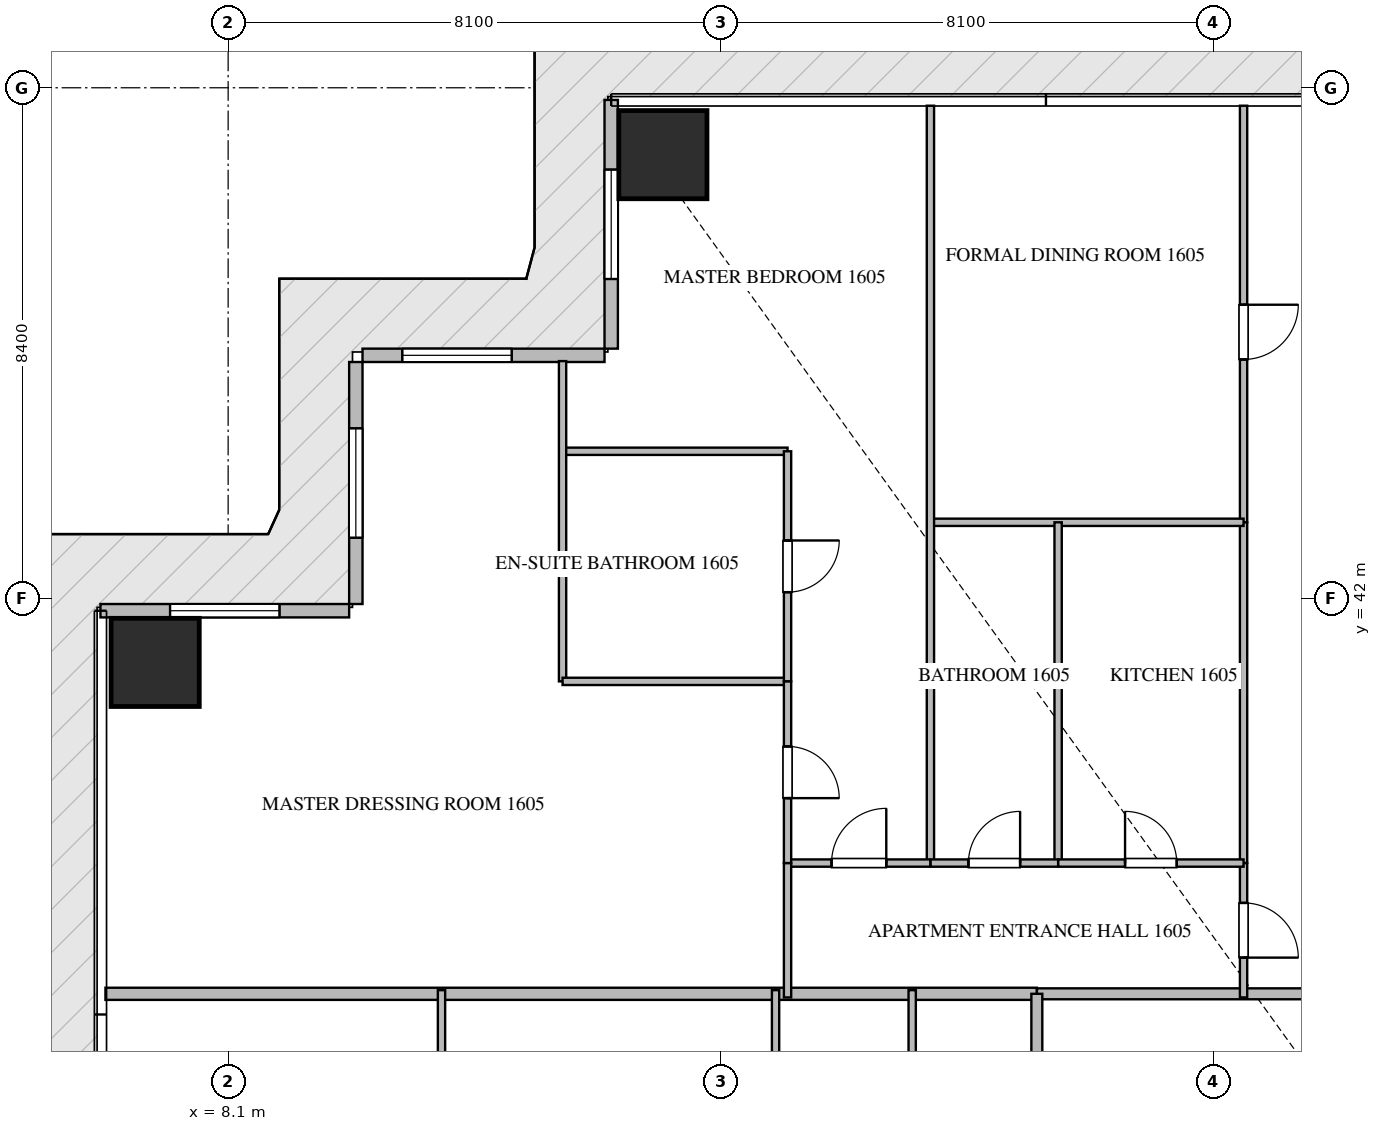
"""IFC4 building model, lengths in metres.
Left out: names, types, materials, properties, quantities, classifications, styles, units other than length and angle.
Written with IfcOpenShell. Run it as: python <this file> out.ifc"""

import sys

from ifc_helpers import new_model, si_unit, direction, frame, frame_2d, origin, origin_2d, place, context, subcontext, project, spatial, rectangle, extrude, source, transform, mapped, element, fill, save


model = new_model("IFC4")
c1 = context("Model", 3, precision=1e-05, world=origin(), true_north=direction((0.0, 1.0)))
c2 = subcontext(c1, "Body", "Model", "MODEL_VIEW")
j1 = project(units=[si_unit("LENGTHUNIT", "METRE"), si_unit("PLANEANGLEUNIT", "RADIAN")], contexts=[c1])
p1 = place(None, origin())
s1 = spatial("IfcSite", under=j1, at=p1, CompositionType="ELEMENT")
p2 = place(p1, origin())
s2 = spatial("IfcBuilding", under=s1, at=p2, CompositionType="ELEMENT")
p3 = place(p2, frame((0.0, 0.0, 67.95)))
s3 = spatial("IfcBuildingStorey", under=s2, at=p3, CompositionType="ELEMENT", Elevation=67.95)
m1 = source(origin(), c2, "Body", "SweptSolid", [
    extrude(rectangle(XDim=1.45, YDim=1.45, at=origin_2d()), origin(), (0.0, 0.0, 1.0), 3.75),
])
for number, where, z_axis, x_axis in (
    (1, (15.25, 49.3, -0.26), (0.0, 0.0, 1.0), (1.0, 0.0, 0.0)),
    (2, (6.9, 40.95, -0.26), (0.0, 0.0, 1.0), (1.0, 0.0, 0.0)),
):
    element("IfcColumn", number, at=place(p3, frame(where, z_axis=z_axis, x_axis=x_axis)), inside=s3, PredefinedType="COLUMN", context=c2, shape_type="MappedRepresentation", body=[
        mapped(m1, transform((0.0, 0.0, 0.0), scale=1.0)),
    ])
p4 = place(p3, frame((14.4, 50.2, 0.0), z_axis=(0.0, 0.0, 1.0), x_axis=(0.0, -1.0, 0.0)))
e3 = element("IfcWall", 3, at=p4, inside=s3, PredefinedType="ELEMENTEDWALL", context=c2, shape_type="SweptSolid", body=[
    extrude(rectangle(XDim=4.09, YDim=0.22, at=frame_2d((2.045, 0.0))), origin(), (0.0, 0.0, 1.0), 3.475),
])
p5 = place(p4, frame((1.145, 0.0, 0.65)))
e4 = element("IfcOpeningElement", 4, at=p5, cuts=e3, PredefinedType="OPENING", context=c2, shape_type="SweptSolid", body=[
    extrude(rectangle(XDim=1.8, YDim=2.1, at=frame_2d((0.9, 1.05))), frame((0.0, 0.12, 0.0), z_axis=(0.0, -1.0, 0.0), x_axis=(1.0, 0.0, 0.0)), (0.0, 0.0, 1.0), 0.24),
])
p6 = place(p3, frame((14.29, 46.0, 0.0), z_axis=(0.0, 0.0, 1.0), x_axis=(-1.0, 0.0, 0.0)))
e5 = element("IfcWall", 5, at=p6, inside=s3, PredefinedType="ELEMENTEDWALL", context=c2, shape_type="SweptSolid", body=[
    extrude(rectangle(XDim=3.98, YDim=0.22, at=frame_2d((1.99, 0.0))), origin(), (0.0, 0.0, 1.0), 3.475),
])
p7 = place(p6, frame((1.526, 0.0, 0.65)))
e6 = element("IfcOpeningElement", 6, at=p7, cuts=e5, PredefinedType="OPENING", context=c2, shape_type="SweptSolid", body=[
    extrude(rectangle(XDim=1.8, YDim=2.1, at=frame_2d((0.9, 1.05))), frame((0.0, 0.12, 0.0), z_axis=(0.0, -1.0, 0.0), x_axis=(1.0, 0.0, 0.0)), (0.0, 0.0, 1.0), 0.24),
])
p8 = place(p3, frame((10.2, 45.89, 0.0), z_axis=(0.0, 0.0, 1.0), x_axis=(0.0, -1.0, 0.0)))
e7 = element("IfcWall", 7, at=p8, inside=s3, PredefinedType="ELEMENTEDWALL", context=c2, shape_type="SweptSolid", body=[
    extrude(rectangle(XDim=3.98, YDim=0.22, at=frame_2d((1.99, 0.0))), origin(), (0.0, 0.0, 1.0), 3.475),
])
p9 = place(p8, frame((1.09, 0.0, 0.65)))
e8 = element("IfcOpeningElement", 8, at=p9, cuts=e7, PredefinedType="OPENING", context=c2, shape_type="SweptSolid", body=[
    extrude(rectangle(XDim=1.8, YDim=2.1, at=frame_2d((0.9, 1.05))), frame((0.0, 0.12, 0.0), z_axis=(0.0, -1.0, 0.0), x_axis=(1.0, 0.0, 0.0)), (0.0, 0.0, 1.0), 0.24),
])
p10 = place(p3, frame((10.09, 41.8, 0.0), z_axis=(0.0, 0.0, 1.0), x_axis=(-1.0, 0.0, 0.0)))
e9 = element("IfcWall", 9, at=p10, inside=s3, PredefinedType="ELEMENTEDWALL", context=c2, shape_type="SweptSolid", body=[
    extrude(rectangle(XDim=4.09, YDim=0.22, at=frame_2d((2.045, 0.0))), origin(), (0.0, 0.0, 1.0), 3.475),
])
p11 = place(p10, frame((1.145, 0.0, 0.65)))
e10 = element("IfcOpeningElement", 10, at=p11, cuts=e9, PredefinedType="OPENING", context=c2, shape_type="SweptSolid", body=[
    extrude(rectangle(XDim=1.8, YDim=2.1, at=frame_2d((0.9, 1.05))), frame((0.0, 0.12, 0.0), z_axis=(0.0, -1.0, 0.0), x_axis=(1.0, 0.0, 0.0)), (0.0, 0.0, 1.0), 0.24),
])
p12 = place(p3, frame((6.082, 35.5, 0.0), z_axis=(0.0, 0.0, 1.0), x_axis=(1.0, 0.0, 0.0)))
e11 = element("IfcWall", 11, at=p12, inside=s3, PredefinedType="PARTITIONING", context=c2, shape_type="SweptSolid", body=[
    extrude(rectangle(XDim=15.318, YDim=0.2, at=frame_2d((7.659, 0.0))), origin(), (0.0, 0.0, 1.0), 3.49),
])
p13 = place(p3, frame((21.402, 35.5, 0.0), z_axis=(0.0, 0.0, 1.0), x_axis=(1.0, 0.0, 0.0)))
e12 = element("IfcWall", 12, at=p13, inside=s3, PredefinedType="PARTITIONING", context=c2, shape_type="SweptSolid", body=[
    extrude(rectangle(XDim=21.996, YDim=0.18, at=frame_2d((10.998, 0.0))), origin(), (0.0, 0.0, 1.0), 3.49),
])
p14 = place(p13, frame((7.202, 0.0, 0.0)))
e13 = element("IfcOpeningElement", 13, at=p14, cuts=e12, PredefinedType="OPENING", context=c2, shape_type="SweptSolid", body=[
    extrude(rectangle(XDim=1.0, YDim=2.15, at=frame_2d((0.5, 1.075))), frame((0.0, 0.1, 0.0), z_axis=(0.0, -1.0, 0.0), x_axis=(1.0, 0.0, 0.0)), (0.0, 0.0, 1.0), 0.2),
])
p15 = place(p3, frame((21.4, 14.9, 0.0), z_axis=(0.0, 0.0, 1.0), x_axis=(0.0, 1.0, 0.0)))
e14 = element("IfcWall", 14, at=p15, inside=s3, PredefinedType="PARTITIONING", context=c2, shape_type="SweptSolid", body=[
    extrude(rectangle(XDim=20.6, YDim=0.18, at=frame_2d((10.3, 0.0))), origin(), (0.0, 0.0, 1.0), 3.49),
])
p16 = place(p15, frame((5.527, 0.0, 0.0)))
e15 = element("IfcOpeningElement", 15, at=p16, cuts=e14, PredefinedType="OPENING", context=c2, shape_type="SweptSolid", body=[
    extrude(rectangle(XDim=1.0, YDim=2.15, at=frame_2d((0.5, 1.075))), frame((0.0, 0.1, 0.0), z_axis=(0.0, -1.0, 0.0), x_axis=(1.0, 0.0, 0.0)), (0.0, 0.0, 1.0), 0.2),
])
p17 = place(p15, frame((10.604, 0.0, 0.0)))
e16 = element("IfcOpeningElement", 16, at=p17, cuts=e14, PredefinedType="OPENING", context=c2, shape_type="SweptSolid", body=[
    extrude(rectangle(XDim=1.0, YDim=2.15, at=frame_2d((0.5, 1.075))), frame((0.0, 0.1, 0.0), z_axis=(0.0, -1.0, 0.0), x_axis=(1.0, 0.0, 0.0)), (0.0, 0.0, 1.0), 0.2),
])
p18 = place(p3, frame((24.8, 37.65, 0.0), z_axis=(0.0, 0.0, 1.0), x_axis=(0.0, -1.0, 0.0)))
e17 = element("IfcWall", 17, at=p18, inside=s3, PredefinedType="PARTITIONING", context=c2, shape_type="SweptSolid", body=[
    extrude(rectangle(XDim=2.21, YDim=0.12, at=frame_2d((1.105, 0.0))), origin(), (0.0, 0.0, 1.0), 3.49),
])
p19 = place(p18, frame((0.655, 0.0, 0.0)))
e18 = element("IfcOpeningElement", 18, at=p19, cuts=e17, PredefinedType="OPENING", context=c2, shape_type="SweptSolid", body=[
    extrude(rectangle(XDim=0.9, YDim=2.1, at=frame_2d((0.45, 1.05))), frame((0.0, 0.07, 0.0), z_axis=(0.0, -1.0, 0.0), x_axis=(1.0, 0.0, 0.0)), (0.0, 0.0, 1.0), 0.14),
])
p20 = place(p3, frame((24.8, 50.105, 0.0), z_axis=(0.0, 0.0, 1.0), x_axis=(0.0, -1.0, 0.0)))
e19 = element("IfcWall", 19, at=p20, inside=s3, PredefinedType="PARTITIONING", context=c2, shape_type="SweptSolid", body=[
    extrude(rectangle(XDim=6.851, YDim=0.12, at=frame_2d((3.426, 0.0))), origin(), (0.0, 0.0, 1.0), 3.49),
])
p21 = place(p20, frame((3.273, 0.0, 0.0)))
e20 = element("IfcOpeningElement", 20, at=p21, cuts=e19, PredefinedType="OPENING", context=c2, shape_type="SweptSolid", body=[
    extrude(rectangle(XDim=0.9, YDim=2.1, at=frame_2d((0.45, 1.05))), frame((0.0, 0.07, 0.0), z_axis=(0.0, -1.0, 0.0), x_axis=(1.0, 0.0, 0.0)), (0.0, 0.0, 1.0), 0.14),
])
p22 = place(p3, frame((24.8, 43.252, 0.0), z_axis=(0.0, 0.0, 1.0), x_axis=(0.0, -1.0, 0.0)))
e21 = element("IfcWall", 21, at=p22, inside=s3, PredefinedType="PARTITIONING", context=c2, shape_type="SweptSolid", body=[
    extrude(rectangle(XDim=5.6, YDim=0.12, at=frame_2d((2.8, 0.0))), origin(), (0.0, 0.0, 1.0), 3.49),
])
p23 = place(p3, frame((19.65, 43.254, 0.0), z_axis=(0.0, 0.0, 1.0), x_axis=(1.0, 0.0, 0.0)))
e22 = element("IfcWall", 22, at=p23, inside=s3, PredefinedType="PARTITIONING", context=c2, shape_type="SweptSolid", body=[
    extrude(rectangle(XDim=5.15, YDim=0.12, at=frame_2d((2.575, 0.0))), origin(), (0.0, 0.0, 1.0), 3.49),
])
p24 = place(p3, frame((19.65, 50.105, 0.0), z_axis=(0.0, 0.0, 1.0), x_axis=(0.0, -1.0, 0.0)))
e23 = element("IfcWall", 23, at=p24, inside=s3, PredefinedType="PARTITIONING", context=c2, shape_type="SweptSolid", body=[
    extrude(rectangle(XDim=12.455, YDim=0.12, at=frame_2d((6.228, 0.0))), origin(), (0.0, 0.0, 1.0), 3.49),
])
p25 = place(p3, frame((21.75, 43.254, 0.0), z_axis=(0.0, 0.0, 1.0), x_axis=(0.0, -1.0, 0.0)))
e24 = element("IfcWall", 24, at=p25, inside=s3, PredefinedType="PARTITIONING", context=c2, shape_type="SweptSolid", body=[
    extrude(rectangle(XDim=5.604, YDim=0.12, at=frame_2d((2.802, 0.0))), origin(), (0.0, 0.0, 1.0), 3.49),
])
p26 = place(p3, frame((19.65, 37.65, 0.0), z_axis=(0.0, 0.0, 1.0), x_axis=(1.0, 0.0, 0.0)))
e25 = element("IfcWall", 25, at=p26, inside=s3, PredefinedType="PARTITIONING", context=c2, shape_type="SweptSolid", body=[
    extrude(rectangle(XDim=2.1, YDim=0.12, at=frame_2d((1.05, 0.0))), origin(), (0.0, 0.0, 1.0), 3.49),
])
p27 = place(p26, frame((0.625, 0.0, 0.0)))
e26 = element("IfcOpeningElement", 26, at=p27, cuts=e25, PredefinedType="OPENING", context=c2, shape_type="SweptSolid", body=[
    extrude(rectangle(XDim=0.85, YDim=2.1, at=frame_2d((0.425, 1.05))), frame((0.0, 0.07, 0.0), z_axis=(0.0, -1.0, 0.0), x_axis=(1.0, 0.0, 0.0)), (0.0, 0.0, 1.0), 0.14),
])
p28 = place(p3, frame((21.752, 37.65, 0.0), z_axis=(0.0, 0.0, 1.0), x_axis=(1.0, 0.0, 0.0)))
e27 = element("IfcWall", 27, at=p28, inside=s3, PredefinedType="PARTITIONING", context=c2, shape_type="SweptSolid", body=[
    extrude(rectangle(XDim=3.048, YDim=0.12, at=frame_2d((1.524, 0.0))), origin(), (0.0, 0.0, 1.0), 3.49),
])
p29 = place(p28, frame((1.099, 0.0, 0.0)))
e28 = element("IfcOpeningElement", 28, at=p29, cuts=e27, PredefinedType="OPENING", context=c2, shape_type="SweptSolid", body=[
    extrude(rectangle(XDim=0.85, YDim=2.1, at=frame_2d((0.425, 1.05))), frame((0.0, 0.07, 0.0), z_axis=(0.0, -1.0, 0.0), x_axis=(1.0, 0.0, 0.0)), (0.0, 0.0, 1.0), 0.14),
])
p30 = place(p3, frame((17.3, 37.65, 0.0), z_axis=(0.0, 0.0, 1.0), x_axis=(1.0, 0.0, 0.0)))
e29 = element("IfcWall", 29, at=p30, inside=s3, PredefinedType="PARTITIONING", context=c2, shape_type="SweptSolid", body=[
    extrude(rectangle(XDim=2.348, YDim=0.12, at=frame_2d((1.174, 0.0))), origin(), (0.0, 0.0, 1.0), 3.49),
])
p31 = place(p30, frame((0.724, 0.0, 0.0)))
e30 = element("IfcOpeningElement", 30, at=p31, cuts=e29, PredefinedType="OPENING", context=c2, shape_type="SweptSolid", body=[
    extrude(rectangle(XDim=0.9, YDim=2.1, at=frame_2d((0.45, 1.05))), frame((0.0, 0.07, 0.0), z_axis=(0.0, -1.0, 0.0), x_axis=(1.0, 0.0, 0.0)), (0.0, 0.0, 1.0), 0.14),
])
p32 = place(p3, frame((13.6, 44.422, 0.0), z_axis=(0.0, 0.0, 1.0), x_axis=(1.0, 0.0, 0.0)))
e31 = element("IfcWall", 31, at=p32, inside=s3, PredefinedType="PARTITIONING", context=c2, shape_type="SweptSolid", body=[
    extrude(rectangle(XDim=3.7, YDim=0.12, at=frame_2d((1.85, 0.0))), origin(), (0.0, 0.0, 1.0), 3.49),
])
p33 = place(p3, frame((13.6, 45.905, 0.0), z_axis=(0.0, 0.0, 1.0), x_axis=(0.0, -1.0, 0.0)))
e32 = element("IfcWall", 32, at=p33, inside=s3, PredefinedType="PARTITIONING", context=c2, shape_type="SweptSolid", body=[
    extrude(rectangle(XDim=5.267, YDim=0.12, at=frame_2d((2.634, 0.0))), origin(), (0.0, 0.0, 1.0), 3.49),
])
p34 = place(p3, frame((13.6, 40.638, 0.0), z_axis=(0.0, 0.0, 1.0), x_axis=(1.0, 0.0, 0.0)))
e33 = element("IfcWall", 33, at=p34, inside=s3, PredefinedType="PARTITIONING", context=c2, shape_type="SweptSolid", body=[
    extrude(rectangle(XDim=3.7, YDim=0.12, at=frame_2d((1.85, 0.0))), origin(), (0.0, 0.0, 1.0), 3.49),
])
p35 = place(p3, frame((17.3, 44.422, 0.0), z_axis=(0.0, 0.0, 1.0), x_axis=(0.0, -1.0, 0.0)))
e34 = element("IfcWall", 34, at=p35, inside=s3, PredefinedType="PARTITIONING", context=c2, shape_type="SweptSolid", body=[
    extrude(rectangle(XDim=3.784, YDim=0.12, at=frame_2d((1.892, 0.0))), origin(), (0.0, 0.0, 1.0), 3.49),
])
p36 = place(p35, frame((1.467, 0.0, 0.0)))
e35 = element("IfcOpeningElement", 35, at=p36, cuts=e34, PredefinedType="OPENING", context=c2, shape_type="SweptSolid", body=[
    extrude(rectangle(XDim=0.85, YDim=2.1, at=frame_2d((0.425, 1.05))), frame((0.0, 0.07, 0.0), z_axis=(0.0, -1.0, 0.0), x_axis=(1.0, 0.0, 0.0)), (0.0, 0.0, 1.0), 0.14),
])
p37 = place(p3, frame((17.3, 40.636, 0.0), z_axis=(0.0, 0.0, 1.0), x_axis=(0.0, -1.0, 0.0)))
e36 = element("IfcWall", 36, at=p37, inside=s3, PredefinedType="PARTITIONING", context=c2, shape_type="SweptSolid", body=[
    extrude(rectangle(XDim=2.986, YDim=0.12, at=frame_2d((1.493, 0.0))), origin(), (0.0, 0.0, 1.0), 3.49),
])
p38 = place(p37, frame((1.068, 0.0, 0.0)))
e37 = element("IfcOpeningElement", 37, at=p38, cuts=e36, PredefinedType="OPENING", context=c2, shape_type="SweptSolid", body=[
    extrude(rectangle(XDim=0.85, YDim=2.1, at=frame_2d((0.425, 1.05))), frame((0.0, 0.07, 0.0), z_axis=(0.0, -1.0, 0.0), x_axis=(1.0, 0.0, 0.0)), (0.0, 0.0, 1.0), 0.14),
])
p39 = place(p3, frame((17.3, 37.648, 0.0), z_axis=(0.0, 0.0, 1.0), x_axis=(0.0, -1.0, 0.0)))
e38 = element("IfcWall", 38, at=p39, inside=s3, PredefinedType="PARTITIONING", context=c2, shape_type="SweptSolid", body=[
    extrude(rectangle(XDim=2.208, YDim=0.12, at=frame_2d((1.104, 0.0))), origin(), (0.0, 0.0, 1.0), 3.49),
])
for number, where, z_axis, x_axis in (
    (39, (11.609, 27.8, 0.0), (0.0, 0.0, 1.0), (0.0, 1.0, 0.0)),
    (40, (17.103, 27.8, 0.0), (0.0, 0.0, 1.0), (0.0, 1.0, 0.0)),
    (41, (19.35, 27.8, 0.0), (0.0, 0.0, 1.0), (0.0, 1.0, 0.0)),
):
    element("IfcWall", number, at=place(p3, frame(where, z_axis=z_axis, x_axis=x_axis)), inside=s3, PredefinedType="PARTITIONING", context=c2, shape_type="SweptSolid", body=[
        extrude(rectangle(XDim=7.76, YDim=0.12, at=frame_2d((3.88, 0.0))), origin(), (0.0, 0.0, 1.0), 3.49),
    ])
m2 = source(origin(), c2, "Body", "SweptSolid", [
    extrude(rectangle(XDim=1.8, YDim=2.1, at=frame_2d((0.9, 1.05))), frame((0.0, 0.03, 0.0), z_axis=(0.0, -1.0, 0.0), x_axis=(1.0, 0.0, 0.0)), (0.0, 0.0, 1.0), 0.06),
])
p40 = place(p5, origin())
e42 = element("IfcWindow", 42, at=p40, inside=s3, PartitioningType="SINGLE_PANEL", PredefinedType="WINDOW", context=c2, shape_type="MappedRepresentation", body=[
    mapped(m2, transform((0.0, 0.0, 0.0), scale=1.0)),
])
fill(e4, e42)
p41 = place(p7, origin())
e43 = element("IfcWindow", 43, at=p41, inside=s3, PartitioningType="SINGLE_PANEL", PredefinedType="WINDOW", context=c2, shape_type="MappedRepresentation", body=[
    mapped(m2, transform((0.0, 0.0, 0.0), scale=1.0)),
])
fill(e6, e43)
p42 = place(p9, origin())
e44 = element("IfcWindow", 44, at=p42, inside=s3, PartitioningType="SINGLE_PANEL", PredefinedType="WINDOW", context=c2, shape_type="MappedRepresentation", body=[
    mapped(m2, transform((0.0, 0.0, 0.0), scale=1.0)),
])
fill(e8, e44)
p43 = place(p11, origin())
e45 = element("IfcWindow", 45, at=p43, inside=s3, PartitioningType="SINGLE_PANEL", PredefinedType="WINDOW", context=c2, shape_type="MappedRepresentation", body=[
    mapped(m2, transform((0.0, 0.0, 0.0), scale=1.0)),
])
fill(e10, e45)
m3 = source(origin(), c2, "Body", "SweptSolid", [
    extrude(rectangle(XDim=0.9, YDim=2.1, at=frame_2d((0.45, 1.05))), frame((0.0, 0.025, 0.0), z_axis=(0.0, -1.0, 0.0), x_axis=(1.0, 0.0, 0.0)), (0.0, 0.0, 1.0), 0.05),
])
p44 = place(p19, origin())
e46 = element("IfcDoor", 46, at=p44, inside=s3, OperationType="SINGLE_SWING_RIGHT", PredefinedType="DOOR", context=c2, shape_type="MappedRepresentation", body=[
    mapped(m3, transform((0.0, 0.0, 0.0), scale=1.0)),
])
fill(e18, e46)
p45 = place(p21, origin())
e47 = element("IfcDoor", 47, at=p45, inside=s3, OperationType="SINGLE_SWING_LEFT", PredefinedType="DOOR", context=c2, shape_type="MappedRepresentation", body=[
    mapped(m3, transform((0.0, 0.0, 0.0), scale=1.0)),
])
fill(e20, e47)
m4 = source(origin(), c2, "Body", "SweptSolid", [
    extrude(rectangle(XDim=0.85, YDim=2.1, at=frame_2d((0.425, 1.05))), frame((0.0, 0.025, 0.0), z_axis=(0.0, -1.0, 0.0), x_axis=(1.0, 0.0, 0.0)), (0.0, 0.0, 1.0), 0.05),
])
p46 = place(p27, origin())
e48 = element("IfcDoor", 48, at=p46, inside=s3, OperationType="SINGLE_SWING_RIGHT", PredefinedType="DOOR", context=c2, shape_type="MappedRepresentation", body=[
    mapped(m4, transform((0.0, 0.0, 0.0), scale=1.0)),
])
fill(e26, e48)
p47 = place(p29, origin())
e49 = element("IfcDoor", 49, at=p47, inside=s3, OperationType="SINGLE_SWING_LEFT", PredefinedType="DOOR", context=c2, shape_type="MappedRepresentation", body=[
    mapped(m4, transform((0.0, 0.0, 0.0), scale=1.0)),
])
fill(e28, e49)
p48 = place(p31, origin())
e50 = element("IfcDoor", 50, at=p48, inside=s3, OperationType="SINGLE_SWING_RIGHT", PredefinedType="DOOR", context=c2, shape_type="MappedRepresentation", body=[
    mapped(m3, transform((0.0, 0.0, 0.0), scale=1.0)),
])
fill(e30, e50)
p49 = place(p36, origin())
e51 = element("IfcDoor", 51, at=p49, inside=s3, OperationType="SINGLE_SWING_LEFT", PredefinedType="DOOR", context=c2, shape_type="MappedRepresentation", body=[
    mapped(m4, transform((0.0, 0.0, 0.0), scale=1.0)),
])
fill(e35, e51)
p50 = place(p38, origin())
e52 = element("IfcDoor", 52, at=p50, inside=s3, OperationType="SINGLE_SWING_RIGHT", PredefinedType="DOOR", context=c2, shape_type="MappedRepresentation", body=[
    mapped(m4, transform((0.0, 0.0, 0.0), scale=1.0)),
])
fill(e37, e52)
save(model, sys.argv[1])
